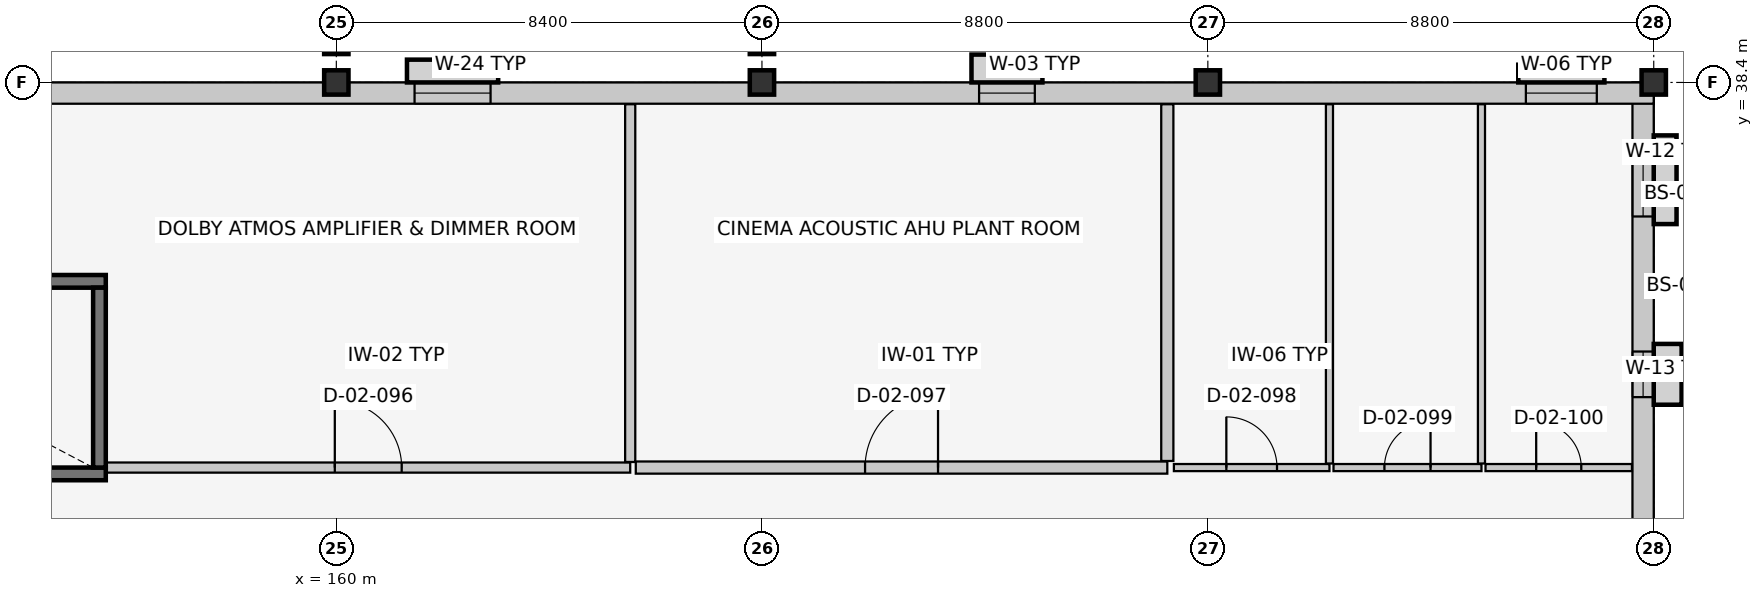
"""IFC4 building model, lengths in metres.
Left out: names, types, materials, properties, quantities, classifications, styles, units other than length and angle.
Written with IfcOpenShell. Run it as: python <this file> out.ifc"""

import sys

from ifc_helpers import new_model, si_unit, direction, frame, frame_2d, origin, origin_2d, place, context, subcontext, project, spatial, rectangle, extrude, element, fill, save


model = new_model("IFC4")
c1 = context("Model", 3, precision=1e-05, world=origin(), true_north=direction((0.0, 1.0)))
c2 = subcontext(c1, "Body", "Model", "MODEL_VIEW")
j1 = project(units=[si_unit("LENGTHUNIT", "METRE"), si_unit("PLANEANGLEUNIT", "RADIAN")], contexts=[c1])
p1 = place(None, origin())
s1 = spatial("IfcSite", under=j1, at=p1, CompositionType="ELEMENT")
p2 = place(p1, origin())
s2 = spatial("IfcBuilding", under=s1, at=p2, CompositionType="ELEMENT")
p3 = place(p2, frame((0.0, 0.0, 9.6)))
s3 = spatial("IfcBuildingStorey", under=s2, at=p3, CompositionType="ELEMENT", Elevation=9.6)
for number, where, z_axis, x_axis in (
    (1, (160.0, 38.4, 0.0), (0.0, 0.0, 1.0), (1.0, 0.0, 0.0)),
    (2, (168.4, 38.4, 0.0), (0.0, 0.0, 1.0), (1.0, 0.0, 0.0)),
    (3, (177.2, 38.4, 0.0), (0.0, 0.0, 1.0), (1.0, 0.0, 0.0)),
    (4, (186.0, 38.4, 0.0), (0.0, 0.0, 1.0), (1.0, 0.0, 0.0)),
    (5, (160.0, 39.2, 0.0), (0.0, 0.0, 1.0), (1.0, 0.0, 0.0)),
    (6, (168.4, 39.2, 0.0), (0.0, 0.0, 1.0), (1.0, 0.0, 0.0)),
):
    element("IfcColumn", number, at=place(p3, frame(where, z_axis=z_axis, x_axis=x_axis)), inside=s3, PredefinedType="COLUMN", context=c2, shape_type="SweptSolid", body=[
        extrude(rectangle(XDim=0.48, YDim=0.48, at=origin_2d()), origin(), (0.0, 0.0, 1.0), 4.2),
    ])
p4 = place(p3, frame((185.79, 38.4, 0.0), z_axis=(0.0, 0.0, 1.0), x_axis=(0.0, -1.0, 0.0)))
e7 = element("IfcWall", 7, at=p4, inside=s3, PredefinedType="SOLIDWALL", context=c2, shape_type="SweptSolid", body=[
    extrude(rectangle(XDim=38.4, YDim=0.42, at=frame_2d((19.2, 0.0))), origin(), (0.0, 0.0, 1.0), 3.825),
])
p5 = place(p4, frame((1.195, 0.0, 0.9)))
e8 = element("IfcOpeningElement", 8, at=p5, cuts=e7, PredefinedType="OPENING", context=c2, shape_type="SweptSolid", body=[
    extrude(rectangle(XDim=1.45, YDim=1.45, at=frame_2d((0.725, 0.725))), frame((0.0, 0.222, 0.0), z_axis=(0.0, -1.0, 0.0), x_axis=(1.0, 0.0, 0.0)), (0.0, 0.0, 1.0), 0.444),
])
p6 = place(p4, frame((5.31, 0.0, 0.9)))
e9 = element("IfcOpeningElement", 9, at=p6, cuts=e7, PredefinedType="OPENING", context=c2, shape_type="SweptSolid", body=[
    extrude(rectangle(XDim=0.9, YDim=1.6, at=frame_2d((0.45, 0.8))), frame((0.0, 0.222, 0.0), z_axis=(0.0, -1.0, 0.0), x_axis=(1.0, 0.0, 0.0)), (0.0, 0.0, 1.0), 0.444),
])
p7 = place(p3, frame((124.0, 38.19, 0.0), z_axis=(0.0, 0.0, 1.0), x_axis=(1.0, 0.0, 0.0)))
e10 = element("IfcWall", 10, at=p7, inside=s3, PredefinedType="SOLIDWALL", context=c2, shape_type="SweptSolid", body=[
    extrude(rectangle(XDim=62.0, YDim=0.42, at=frame_2d((31.0, 0.0))), origin(), (0.0, 0.0, 1.0), 3.675),
])
p8 = place(p7, frame((1.299, 0.0, 0.9)))
e11 = element("IfcOpeningElement", 11, at=p8, cuts=e10, PredefinedType="OPENING", context=c2, shape_type="SweptSolid", body=[
    extrude(rectangle(XDim=1.05, YDim=1.6, at=frame_2d((0.525, 0.8))), frame((0.0, 0.222, 0.0), z_axis=(0.0, -1.0, 0.0), x_axis=(1.0, 0.0, 0.0)), (0.0, 0.0, 1.0), 0.444),
])
p9 = place(p7, frame((4.896, 0.0, 0.9)))
e12 = element("IfcOpeningElement", 12, at=p9, cuts=e10, PredefinedType="OPENING", context=c2, shape_type="SweptSolid", body=[
    extrude(rectangle(XDim=1.15, YDim=1.6, at=frame_2d((0.575, 0.8))), frame((0.0, 0.222, 0.0), z_axis=(0.0, -1.0, 0.0), x_axis=(1.0, 0.0, 0.0)), (0.0, 0.0, 1.0), 0.444),
])
p10 = place(p7, frame((8.493, 0.0, 0.9)))
e13 = element("IfcOpeningElement", 13, at=p10, cuts=e10, PredefinedType="OPENING", context=c2, shape_type="SweptSolid", body=[
    extrude(rectangle(XDim=1.25, YDim=1.6, at=frame_2d((0.625, 0.8))), frame((0.0, 0.222, 0.0), z_axis=(0.0, -1.0, 0.0), x_axis=(1.0, 0.0, 0.0)), (0.0, 0.0, 1.0), 0.444),
])
p11 = place(p7, frame((12.075, 0.0, 0.9)))
e14 = element("IfcOpeningElement", 14, at=p11, cuts=e10, PredefinedType="OPENING", context=c2, shape_type="SweptSolid", body=[
    extrude(rectangle(XDim=1.38, YDim=1.6, at=frame_2d((0.69, 0.8))), frame((0.0, 0.222, 0.0), z_axis=(0.0, -1.0, 0.0), x_axis=(1.0, 0.0, 0.0)), (0.0, 0.0, 1.0), 0.444),
])
p12 = place(p7, frame((15.662, 0.0, 0.9)))
e15 = element("IfcOpeningElement", 15, at=p12, cuts=e10, PredefinedType="OPENING", context=c2, shape_type="SweptSolid", body=[
    extrude(rectangle(XDim=1.5, YDim=1.6, at=frame_2d((0.75, 0.8))), frame((0.0, 0.222, 0.0), z_axis=(0.0, -1.0, 0.0), x_axis=(1.0, 0.0, 0.0)), (0.0, 0.0, 1.0), 0.444),
])
p13 = place(p7, frame((19.559, 0.0, 0.9)))
e16 = element("IfcOpeningElement", 16, at=p13, cuts=e10, PredefinedType="OPENING", context=c2, shape_type="SweptSolid", body=[
    extrude(rectangle(XDim=1.0, YDim=1.75, at=frame_2d((0.5, 0.875))), frame((0.0, 0.222, 0.0), z_axis=(0.0, -1.0, 0.0), x_axis=(1.0, 0.0, 0.0)), (0.0, 0.0, 1.0), 0.444),
])
p14 = place(p7, frame((26.733, 0.0, 0.9)))
e17 = element("IfcOpeningElement", 17, at=p14, cuts=e10, PredefinedType="OPENING", context=c2, shape_type="SweptSolid", body=[
    extrude(rectangle(XDim=1.24, YDim=1.75, at=frame_2d((0.62, 0.875))), frame((0.0, 0.222, 0.0), z_axis=(0.0, -1.0, 0.0), x_axis=(1.0, 0.0, 0.0)), (0.0, 0.0, 1.0), 0.444),
])
p15 = place(p7, frame((37.544, 0.0, 0.9)))
e18 = element("IfcOpeningElement", 18, at=p15, cuts=e10, PredefinedType="OPENING", context=c2, shape_type="SweptSolid", body=[
    extrude(rectangle(XDim=1.5, YDim=1.75, at=frame_2d((0.75, 0.875))), frame((0.0, 0.222, 0.0), z_axis=(0.0, -1.0, 0.0), x_axis=(1.0, 0.0, 0.0)), (0.0, 0.0, 1.0), 0.444),
])
p16 = place(p7, frame((48.685, 0.0, 0.9)))
e19 = element("IfcOpeningElement", 19, at=p16, cuts=e10, PredefinedType="OPENING", context=c2, shape_type="SweptSolid", body=[
    extrude(rectangle(XDim=1.1, YDim=1.35, at=frame_2d((0.55, 0.675))), frame((0.0, 0.222, 0.0), z_axis=(0.0, -1.0, 0.0), x_axis=(1.0, 0.0, 0.0)), (0.0, 0.0, 1.0), 0.444),
])
p17 = place(p7, frame((59.477, 0.0, 0.9)))
e20 = element("IfcOpeningElement", 20, at=p17, cuts=e10, PredefinedType="OPENING", context=c2, shape_type="SweptSolid", body=[
    extrude(rectangle(XDim=1.4, YDim=1.35, at=frame_2d((0.7, 0.675))), frame((0.0, 0.222, 0.0), z_axis=(0.0, -1.0, 0.0), x_axis=(1.0, 0.0, 0.0)), (0.0, 0.0, 1.0), 0.444),
])
for number, where, z_axis, x_axis in (
    (21, (146.55, 30.675, 0.0), (0.0, 0.0, 1.0), (1.0, 0.0, 0.0)),
    (22, (155.45, 34.475, 0.0), (0.0, 0.0, 1.0), (-1.0, 0.0, 0.0)),
):
    element("IfcWall", number, at=place(p3, frame(where, z_axis=z_axis, x_axis=x_axis)), inside=s3, PredefinedType="SHEAR", context=c2, shape_type="SweptSolid", body=[
        extrude(rectangle(XDim=8.9, YDim=0.25, at=frame_2d((4.45, 0.0))), origin(), (0.0, 0.0, 1.0), 3.95),
    ])
p18 = place(p3, frame((155.325, 30.8, 0.0), z_axis=(0.0, 0.0, 1.0), x_axis=(0.0, 1.0, 0.0)))
e23 = element("IfcWall", 23, at=p18, inside=s3, PredefinedType="SHEAR", context=c2, shape_type="SweptSolid", body=[
    extrude(rectangle(XDim=3.55, YDim=0.25, at=frame_2d((1.775, 0.0))), origin(), (0.0, 0.0, 1.0), 3.95),
])
p19 = place(p3, frame((155.46, 30.8, 0.0), z_axis=(0.0, 0.0, 1.0), x_axis=(1.0, 0.0, 0.0)))
e24 = element("IfcWall", 24, at=p19, inside=s3, PredefinedType="PARTITIONING", context=c2, shape_type="SweptSolid", body=[
    extrude(rectangle(XDim=10.34, YDim=0.2, at=frame_2d((5.17, 0.0))), origin(), (0.0, 0.0, 1.0), 3.95),
])
p20 = place(p19, frame((4.51, 0.0, 0.0)))
e25 = element("IfcOpeningElement", 25, at=p20, cuts=e24, PredefinedType="OPENING", context=c2, shape_type="SweptSolid", body=[
    extrude(rectangle(XDim=1.32, YDim=2.15, at=frame_2d((0.66, 1.075))), frame((0.0, 0.112, 0.0), z_axis=(0.0, -1.0, 0.0), x_axis=(1.0, 0.0, 0.0)), (0.0, 0.0, 1.0), 0.224),
])
p21 = place(p3, frame((165.8, 30.91, 0.0), z_axis=(0.0, 0.0, 1.0), x_axis=(0.0, 1.0, 0.0)))
e26 = element("IfcWall", 26, at=p21, inside=s3, PredefinedType="PARTITIONING", context=c2, shape_type="SweptSolid", body=[
    extrude(rectangle(XDim=7.06, YDim=0.2, at=frame_2d((3.53, 0.0))), origin(), (0.0, 0.0, 1.0), 3.95),
])
p22 = place(p3, frame((165.91, 30.8, 0.0), z_axis=(0.0, 0.0, 1.0), x_axis=(1.0, 0.0, 0.0)))
e27 = element("IfcWall", 27, at=p22, inside=s3, PredefinedType="PARTITIONING", context=c2, shape_type="SweptSolid", body=[
    extrude(rectangle(XDim=10.49, YDim=0.24, at=frame_2d((5.245, 0.0))), origin(), (0.0, 0.0, 1.0), 3.95),
])
p23 = place(p22, frame((4.525, 0.0, 0.0)))
e28 = element("IfcOpeningElement", 28, at=p23, cuts=e27, PredefinedType="OPENING", context=c2, shape_type="SweptSolid", body=[
    extrude(rectangle(XDim=1.44, YDim=2.2, at=frame_2d((0.72, 1.1))), frame((0.0, 0.132, 0.0), z_axis=(0.0, -1.0, 0.0), x_axis=(1.0, 0.0, 0.0)), (0.0, 0.0, 1.0), 0.264),
])
p24 = place(p3, frame((176.4, 30.93, 0.0), z_axis=(0.0, 0.0, 1.0), x_axis=(0.0, 1.0, 0.0)))
e29 = element("IfcWall", 29, at=p24, inside=s3, PredefinedType="PARTITIONING", context=c2, shape_type="SweptSolid", body=[
    extrude(rectangle(XDim=7.04, YDim=0.24, at=frame_2d((3.52, 0.0))), origin(), (0.0, 0.0, 1.0), 3.95),
])
p25 = place(p3, frame((176.53, 30.8, 0.0), z_axis=(0.0, 0.0, 1.0), x_axis=(1.0, 0.0, 0.0)))
e30 = element("IfcWall", 30, at=p25, inside=s3, PredefinedType="PARTITIONING", context=c2, shape_type="SweptSolid", body=[
    extrude(rectangle(XDim=3.07, YDim=0.14, at=frame_2d((1.535, 0.0))), origin(), (0.0, 0.0, 1.0), 3.95),
])
p26 = place(p25, frame((1.035, 0.0, 0.0)))
e31 = element("IfcOpeningElement", 31, at=p26, cuts=e30, PredefinedType="OPENING", context=c2, shape_type="SweptSolid", body=[
    extrude(rectangle(XDim=1.0, YDim=2.1, at=frame_2d((0.5, 1.05))), frame((0.0, 0.082, 0.0), z_axis=(0.0, -1.0, 0.0), x_axis=(1.0, 0.0, 0.0)), (0.0, 0.0, 1.0), 0.164),
])
p27 = place(p3, frame((179.6, 30.88, 0.0), z_axis=(0.0, 0.0, 1.0), x_axis=(0.0, 1.0, 0.0)))
e32 = element("IfcWall", 32, at=p27, inside=s3, PredefinedType="PARTITIONING", context=c2, shape_type="SweptSolid", body=[
    extrude(rectangle(XDim=7.09, YDim=0.14, at=frame_2d((3.545, 0.0))), origin(), (0.0, 0.0, 1.0), 3.95),
])
p28 = place(p3, frame((179.68, 30.8, 0.0), z_axis=(0.0, 0.0, 1.0), x_axis=(1.0, 0.0, 0.0)))
e33 = element("IfcWall", 33, at=p28, inside=s3, PredefinedType="PARTITIONING", context=c2, shape_type="SweptSolid", body=[
    extrude(rectangle(XDim=2.92, YDim=0.14, at=frame_2d((1.46, 0.0))), origin(), (0.0, 0.0, 1.0), 3.95),
])
p29 = place(p28, frame((1.005, 0.0, 0.0)))
e34 = element("IfcOpeningElement", 34, at=p29, cuts=e33, PredefinedType="OPENING", context=c2, shape_type="SweptSolid", body=[
    extrude(rectangle(XDim=0.91, YDim=2.06, at=frame_2d((0.455, 1.03))), frame((0.0, 0.082, 0.0), z_axis=(0.0, -1.0, 0.0), x_axis=(1.0, 0.0, 0.0)), (0.0, 0.0, 1.0), 0.164),
])
p30 = place(p3, frame((182.6, 30.88, 0.0), z_axis=(0.0, 0.0, 1.0), x_axis=(0.0, 1.0, 0.0)))
e35 = element("IfcWall", 35, at=p30, inside=s3, PredefinedType="PARTITIONING", context=c2, shape_type="SweptSolid", body=[
    extrude(rectangle(XDim=7.09, YDim=0.14, at=frame_2d((3.545, 0.0))), origin(), (0.0, 0.0, 1.0), 3.95),
])
p31 = place(p3, frame((182.68, 30.8, 0.0), z_axis=(0.0, 0.0, 1.0), x_axis=(1.0, 0.0, 0.0)))
e36 = element("IfcWall", 36, at=p31, inside=s3, PredefinedType="PARTITIONING", context=c2, shape_type="SweptSolid", body=[
    extrude(rectangle(XDim=2.89, YDim=0.14, at=frame_2d((1.445, 0.0))), origin(), (0.0, 0.0, 1.0), 3.95),
])
p32 = place(p31, frame((1.0, 0.0, 0.0)))
e37 = element("IfcOpeningElement", 37, at=p32, cuts=e36, PredefinedType="OPENING", context=c2, shape_type="SweptSolid", body=[
    extrude(rectangle(XDim=0.89, YDim=2.05, at=frame_2d((0.445, 1.025))), frame((0.0, 0.082, 0.0), z_axis=(0.0, -1.0, 0.0), x_axis=(1.0, 0.0, 0.0)), (0.0, 0.0, 1.0), 0.164),
])
p33 = place(p5, origin())
e38 = element("IfcWindow", 38, at=p33, inside=s3, PartitioningType="SINGLE_PANEL", PredefinedType="WINDOW", context=c2, shape_type="SweptSolid", body=[
    extrude(rectangle(XDim=1.45, YDim=1.45, at=frame_2d((0.725, 0.725))), frame((0.0, 0.03, 0.0), z_axis=(0.0, -1.0, 0.0), x_axis=(1.0, 0.0, 0.0)), (0.0, 0.0, 1.0), 0.06),
])
fill(e8, e38)
p34 = place(p6, origin())
e39 = element("IfcWindow", 39, at=p34, inside=s3, PartitioningType="SINGLE_PANEL", PredefinedType="WINDOW", context=c2, shape_type="SweptSolid", body=[
    extrude(rectangle(XDim=0.9, YDim=1.6, at=frame_2d((0.45, 0.8))), frame((0.0, 0.03, 0.0), z_axis=(0.0, -1.0, 0.0), x_axis=(1.0, 0.0, 0.0)), (0.0, 0.0, 1.0), 0.06),
])
fill(e9, e39)
p35 = place(p15, origin())
e40 = element("IfcWindow", 40, at=p35, inside=s3, PartitioningType="SINGLE_PANEL", PredefinedType="WINDOW", context=c2, shape_type="SweptSolid", body=[
    extrude(rectangle(XDim=1.5, YDim=1.75, at=frame_2d((0.75, 0.875))), frame((0.0, 0.03, 0.0), z_axis=(0.0, -1.0, 0.0), x_axis=(1.0, 0.0, 0.0)), (0.0, 0.0, 1.0), 0.06),
])
fill(e18, e40)
p36 = place(p16, origin())
e41 = element("IfcWindow", 41, at=p36, inside=s3, PartitioningType="SINGLE_PANEL", PredefinedType="WINDOW", context=c2, shape_type="SweptSolid", body=[
    extrude(rectangle(XDim=1.1, YDim=1.35, at=frame_2d((0.55, 0.675))), frame((0.0, 0.03, 0.0), z_axis=(0.0, -1.0, 0.0), x_axis=(1.0, 0.0, 0.0)), (0.0, 0.0, 1.0), 0.06),
])
fill(e19, e41)
p37 = place(p17, origin())
e42 = element("IfcWindow", 42, at=p37, inside=s3, PartitioningType="SINGLE_PANEL", PredefinedType="WINDOW", context=c2, shape_type="SweptSolid", body=[
    extrude(rectangle(XDim=1.4, YDim=1.35, at=frame_2d((0.7, 0.675))), frame((0.0, 0.03, 0.0), z_axis=(0.0, -1.0, 0.0), x_axis=(1.0, 0.0, 0.0)), (0.0, 0.0, 1.0), 0.06),
])
fill(e20, e42)
p38 = place(p20, origin())
e43 = element("IfcDoor", 43, at=p38, inside=s3, OperationType="SINGLE_SWING_LEFT", PredefinedType="DOOR", context=c2, shape_type="SweptSolid", body=[
    extrude(rectangle(XDim=1.32, YDim=2.15, at=frame_2d((0.66, 1.075))), frame((0.0, 0.025, 0.0), z_axis=(0.0, -1.0, 0.0), x_axis=(1.0, 0.0, 0.0)), (0.0, 0.0, 1.0), 0.05),
])
fill(e25, e43)
p39 = place(p23, origin())
e44 = element("IfcDoor", 44, at=p39, inside=s3, OperationType="SINGLE_SWING_RIGHT", PredefinedType="DOOR", context=c2, shape_type="SweptSolid", body=[
    extrude(rectangle(XDim=1.44, YDim=2.2, at=frame_2d((0.72, 1.1))), frame((0.0, 0.025, 0.0), z_axis=(0.0, -1.0, 0.0), x_axis=(1.0, 0.0, 0.0)), (0.0, 0.0, 1.0), 0.05),
])
fill(e28, e44)
p40 = place(p26, origin())
e45 = element("IfcDoor", 45, at=p40, inside=s3, OperationType="SINGLE_SWING_LEFT", PredefinedType="DOOR", context=c2, shape_type="SweptSolid", body=[
    extrude(rectangle(XDim=1.0, YDim=2.1, at=frame_2d((0.5, 1.05))), frame((0.0, 0.025, 0.0), z_axis=(0.0, -1.0, 0.0), x_axis=(1.0, 0.0, 0.0)), (0.0, 0.0, 1.0), 0.05),
])
fill(e31, e45)
p41 = place(p29, origin())
e46 = element("IfcDoor", 46, at=p41, inside=s3, OperationType="SINGLE_SWING_RIGHT", PredefinedType="DOOR", context=c2, shape_type="SweptSolid", body=[
    extrude(rectangle(XDim=0.91, YDim=2.06, at=frame_2d((0.455, 1.03))), frame((0.0, 0.025, 0.0), z_axis=(0.0, -1.0, 0.0), x_axis=(1.0, 0.0, 0.0)), (0.0, 0.0, 1.0), 0.05),
])
fill(e34, e46)
p42 = place(p32, origin())
e47 = element("IfcDoor", 47, at=p42, inside=s3, OperationType="SINGLE_SWING_LEFT", PredefinedType="DOOR", context=c2, shape_type="SweptSolid", body=[
    extrude(rectangle(XDim=0.89, YDim=2.05, at=frame_2d((0.445, 1.025))), frame((0.0, 0.025, 0.0), z_axis=(0.0, -1.0, 0.0), x_axis=(1.0, 0.0, 0.0)), (0.0, 0.0, 1.0), 0.05),
])
fill(e37, e47)
save(model, sys.argv[1])
